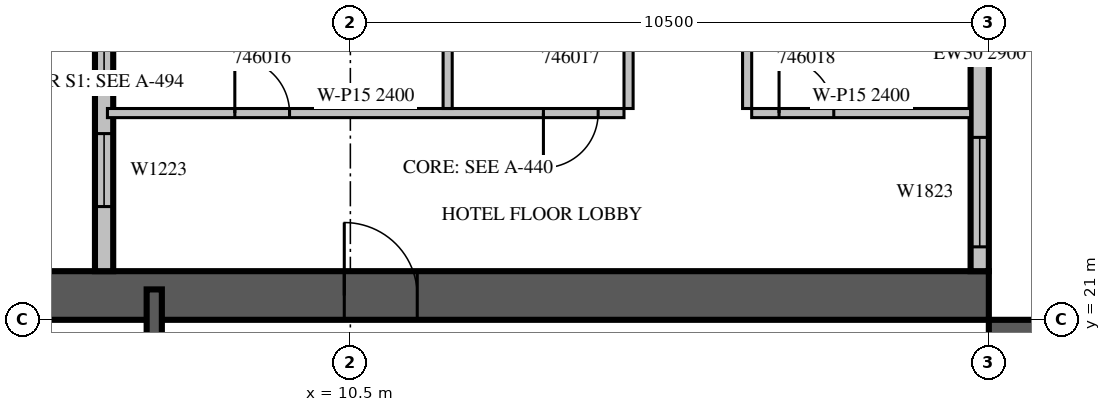
"""IFC4 building model, lengths in metres.
Left out: names, types, materials, properties, quantities, classifications, styles, units other than length and angle.
Written with IfcOpenShell. Run it as: python <this file> out.ifc"""

import sys

from ifc_helpers import new_model, si_unit, direction, frame, frame_2d, origin, place, context, subcontext, project, spatial, rectangle, extrude, source, transform, mapped, element, fill, save


model = new_model("IFC4")
c1 = context("Model", 3, precision=1e-05, world=origin(), true_north=direction((0.0, 1.0)))
c2 = subcontext(c1, "Body", "Model", "MODEL_VIEW")
j1 = project(units=[si_unit("LENGTHUNIT", "METRE"), si_unit("PLANEANGLEUNIT", "RADIAN")], contexts=[c1])
p1 = place(None, origin())
s1 = spatial("IfcSite", under=j1, at=p1, CompositionType="ELEMENT")
p2 = place(p1, origin())
s2 = spatial("IfcBuilding", under=s1, at=p2, CompositionType="ELEMENT")
p3 = place(p2, frame((0.0, 0.0, 208.2)))
s3 = spatial("IfcBuildingStorey", under=s2, at=p3, CompositionType="ELEMENT", Elevation=208.2)
m1 = source(origin(), c2, "Body", "SweptSolid", [
    extrude(rectangle(XDim=16.8, YDim=0.8, at=frame_2d((8.4, 0.0))), origin(), (0.0, 0.0, 1.0), 3.8),
])
p4 = place(p3, frame((21.4, 4.2, 0.0), z_axis=(0.0, 0.0, 1.0), x_axis=(0.0, 1.0, 0.0)))
e1 = element("IfcWall", 1, at=p4, inside=s3, PredefinedType="SHEAR", context=c2, shape_type="MappedRepresentation", body=[
    mapped(m1, transform((0.0, 0.0, 0.0), scale=1.0)),
])
m2 = source(origin(), c2, "Body", "SweptSolid", [
    extrude(rectangle(XDim=1.2, YDim=2.1, at=frame_2d((0.6, 1.05))), frame((0.0, 0.41, 0.0), z_axis=(0.0, -1.0, 0.0), x_axis=(1.0, 0.0, 0.0)), (0.0, 0.0, 1.0), 0.82),
])
p5 = place(p4, frame((14.7, 0.0, 0.0)))
e2 = element("IfcOpeningElement", 2, at=p5, cuts=e1, PredefinedType="OPENING", context=c2, shape_type="MappedRepresentation", body=[
    mapped(m2, transform((0.0, 0.0, 0.0), scale=1.0)),
])
p6 = place(p3, frame((4.2, 21.4, 0.0), z_axis=(0.0, 0.0, 1.0), x_axis=(1.0, 0.0, 0.0)))
e3 = element("IfcWall", 3, at=p6, inside=s3, PredefinedType="SHEAR", context=c2, shape_type="MappedRepresentation", body=[
    mapped(m1, transform((0.0, 0.0, 0.0), scale=1.0)),
])
p7 = place(p6, frame((6.2, 0.0, 0.0)))
e4 = element("IfcOpeningElement", 4, at=p7, cuts=e3, PredefinedType="OPENING", context=c2, shape_type="MappedRepresentation", body=[
    mapped(m2, transform((0.0, 0.0, 0.0), scale=1.0)),
])
p8 = place(p3, frame((20.85, 21.8, 0.0), z_axis=(0.0, 0.0, 1.0), x_axis=(0.0, 1.0, 0.0)))
e5 = element("IfcWall", 5, at=p8, inside=s3, PredefinedType="STANDARD", context=c2, shape_type="SweptSolid", body=[
    extrude(rectangle(XDim=7.15, YDim=0.3, at=frame_2d((3.575, 0.0))), origin(), (0.0, 0.0, 1.0), 2.9),
])
m3 = source(origin(), c2, "Body", "SweptSolid", [
    extrude(rectangle(XDim=1.8, YDim=2.3, at=frame_2d((0.9, 1.15))), frame((0.0, 0.16, 0.0), z_axis=(0.0, -1.0, 0.0), x_axis=(1.0, 0.0, 0.0)), (0.0, 0.0, 1.0), 0.32),
])
p9 = place(p8, frame((0.4, 0.0, 0.6)))
e6 = element("IfcOpeningElement", 6, at=p9, cuts=e5, PredefinedType="OPENING", context=c2, shape_type="MappedRepresentation", body=[
    mapped(m3, transform((0.0, 0.0, 0.0), scale=1.0)),
])
m4 = source(origin(), c2, "Body", "SweptSolid", [
    extrude(rectangle(XDim=3.0, YDim=2.3, at=frame_2d((1.5, 1.15))), frame((0.0, 0.16, 0.0), z_axis=(0.0, -1.0, 0.0), x_axis=(1.0, 0.0, 0.0)), (0.0, 0.0, 1.0), 0.32),
])
p10 = place(p8, frame((4.0, 0.0, 0.6)))
e7 = element("IfcOpeningElement", 7, at=p10, cuts=e5, PredefinedType="OPENING", context=c2, shape_type="MappedRepresentation", body=[
    mapped(m4, transform((0.0, 0.0, 0.0), scale=1.0)),
])
m5 = source(origin(), c2, "Body", "SweptSolid", [
    extrude(rectangle(XDim=16.6, YDim=0.3, at=frame_2d((8.3, 0.0))), origin(), (0.0, 0.0, 1.0), 3.4),
])
p11 = place(p3, frame((6.45, 38.4, 0.0), z_axis=(0.0, 0.0, 1.0), x_axis=(0.0, -1.0, 0.0)))
e8 = element("IfcWall", 8, at=p11, inside=s3, PredefinedType="STANDARD", context=c2, shape_type="MappedRepresentation", body=[
    mapped(m5, transform((0.0, 0.0, 0.0), scale=1.0)),
])
p12 = place(p11, frame((1.15, 0.0, 0.6)))
e9 = element("IfcOpeningElement", 9, at=p12, cuts=e8, PredefinedType="OPENING", context=c2, shape_type="MappedRepresentation", body=[
    mapped(m3, transform((0.0, 0.0, 0.0), scale=1.0)),
])
p13 = place(p11, frame((9.438, 0.0, 0.6)))
e10 = element("IfcOpeningElement", 10, at=p13, cuts=e8, PredefinedType="OPENING", context=c2, shape_type="MappedRepresentation", body=[
    mapped(m3, transform((0.0, 0.0, 0.0), scale=1.0)),
])
m6 = source(origin(), c2, "Body", "SweptSolid", [
    extrude(rectangle(XDim=1.2, YDim=2.3, at=frame_2d((0.6, 1.15))), frame((0.0, 0.16, 0.0), z_axis=(0.0, -1.0, 0.0), x_axis=(1.0, 0.0, 0.0)), (0.0, 0.0, 1.0), 0.32),
])
p14 = place(p11, frame((14.338, 0.0, 0.6)))
e11 = element("IfcOpeningElement", 11, at=p14, cuts=e8, PredefinedType="OPENING", context=c2, shape_type="MappedRepresentation", body=[
    mapped(m6, transform((0.0, 0.0, 0.0), scale=1.0)),
])
p15 = place(p11, frame((11.887, 0.0, 0.6)))
e12 = element("IfcOpeningElement", 12, at=p15, cuts=e8, PredefinedType="OPENING", context=c2, shape_type="MappedRepresentation", body=[
    mapped(m3, transform((0.0, 0.0, 0.0), scale=1.0)),
])
m7 = source(origin(), c2, "Body", "SweptSolid", [
    extrude(rectangle(XDim=1.0, YDim=2.1, at=frame_2d((0.5, 1.05))), frame((0.0, 0.16, 0.0), z_axis=(0.0, -1.0, 0.0), x_axis=(1.0, 0.0, 0.0)), (0.0, 0.0, 1.0), 0.32),
])
p16 = place(p11, frame((5.45, 0.0, 0.0)))
e13 = element("IfcOpeningElement", 13, at=p16, cuts=e8, PredefinedType="OPENING", context=c2, shape_type="MappedRepresentation", body=[
    mapped(m7, transform((0.0, 0.0, 0.0), scale=1.0)),
])
m8 = source(origin(), c2, "Body", "SweptSolid", [
    extrude(rectangle(XDim=6.6, YDim=0.25, at=frame_2d((3.3, 0.0))), origin(), (0.0, 0.0, 1.0), 3.4),
])
p17 = place(p3, frame((7.275, 14.9, 0.0), z_axis=(0.0, 0.0, 1.0), x_axis=(0.0, 1.0, 0.0)))
e14 = element("IfcWall", 14, at=p17, inside=s3, PredefinedType="SOLIDWALL", context=c2, shape_type="MappedRepresentation", body=[
    mapped(m8, transform((0.0, 0.0, 0.0), scale=1.0)),
])
m9 = source(origin(), c2, "Body", "SweptSolid", [
    extrude(rectangle(XDim=1.1, YDim=2.1, at=frame_2d((0.55, 1.05))), frame((0.0, 0.135, 0.0), z_axis=(0.0, -1.0, 0.0), x_axis=(1.0, 0.0, 0.0)), (0.0, 0.0, 1.0), 0.27),
])
p18 = place(p17, frame((0.15, 0.0, 0.0)))
e15 = element("IfcOpeningElement", 15, at=p18, cuts=e14, PredefinedType="OPENING", context=c2, shape_type="MappedRepresentation", body=[
    mapped(m9, transform((0.0, 0.0, 0.0), scale=1.0)),
])
p19 = place(p3, frame((6.505, 24.4, 0.0), z_axis=(0.0, 0.0, 1.0), x_axis=(1.0, 0.0, 0.0)))
e16 = element("IfcWall", 16, at=p19, inside=s3, PredefinedType="PARTITIONING", context=c2, shape_type="SweptSolid", body=[
    extrude(rectangle(XDim=8.495, YDim=0.15, at=frame_2d((4.247, 0.0))), origin(), (0.0, 0.0, 1.0), 2.4),
])
m10 = source(origin(), c2, "Body", "SweptSolid", [
    extrude(rectangle(XDim=0.9, YDim=2.1, at=frame_2d((0.45, 1.05))), frame((0.0, 0.085, 0.0), z_axis=(0.0, -1.0, 0.0), x_axis=(1.0, 0.0, 0.0)), (0.0, 0.0, 1.0), 0.17),
])
p20 = place(p19, frame((2.095, 0.0, 0.0)))
e17 = element("IfcOpeningElement", 17, at=p20, cuts=e16, PredefinedType="OPENING", context=c2, shape_type="MappedRepresentation", body=[
    mapped(m10, transform((0.0, 0.0, 0.0), scale=1.0)),
])
p21 = place(p19, frame((7.17, 0.0, 0.0)))
e18 = element("IfcOpeningElement", 18, at=p21, cuts=e16, PredefinedType="OPENING", context=c2, shape_type="MappedRepresentation", body=[
    mapped(m10, transform((0.0, 0.0, 0.0), scale=1.0)),
])
m11 = source(origin(), c2, "Body", "SweptSolid", [
    extrude(rectangle(XDim=3.6, YDim=0.15, at=frame_2d((1.8, 0.0))), origin(), (0.0, 0.0, 1.0), 2.4),
])
p22 = place(p3, frame((17.1, 24.4, 0.0), z_axis=(0.0, 0.0, 1.0), x_axis=(1.0, 0.0, 0.0)))
e19 = element("IfcWall", 19, at=p22, inside=s3, PredefinedType="PARTITIONING", context=c2, shape_type="MappedRepresentation", body=[
    mapped(m11, transform((0.0, 0.0, 0.0), scale=1.0)),
])
p23 = place(p22, frame((0.45, 0.0, 0.0)))
e20 = element("IfcOpeningElement", 20, at=p23, cuts=e19, PredefinedType="OPENING", context=c2, shape_type="MappedRepresentation", body=[
    mapped(m10, transform((0.0, 0.0, 0.0), scale=1.0)),
])
p24 = place(p3, frame((12.1, 24.475, 0.0), z_axis=(0.0, 0.0, 1.0), x_axis=(0.0, 1.0, 0.0)))
e21 = element("IfcWall", 21, at=p24, inside=s3, PredefinedType="PARTITIONING", context=c2, shape_type="SweptSolid", body=[
    extrude(rectangle(XDim=4.85, YDim=0.15, at=frame_2d((2.425, 0.0))), origin(), (0.0, 0.0, 1.0), 2.9),
])
m12 = source(origin(), c2, "Body", "SweptSolid", [
    extrude(rectangle(XDim=4.85, YDim=0.15, at=frame_2d((2.425, 0.0))), origin(), (0.0, 0.0, 1.0), 2.9),
])
for number, where, z_axis, x_axis in (
    (22, (15.075, 24.475, 0.0), (0.0, 0.0, 1.0), (0.0, 1.0, 0.0)),
    (23, (17.025, 29.325, 0.0), (0.0, 0.0, 1.0), (0.0, -1.0, 0.0)),
):
    element("IfcWall", number, at=place(p3, frame(where, z_axis=z_axis, x_axis=x_axis)), inside=s3, PredefinedType="PARTITIONING", context=c2, shape_type="MappedRepresentation", body=[
        mapped(m12, transform((0.0, 0.0, 0.0), scale=1.0)),
    ])
m13 = source(origin(), c2, "Body", "SweptSolid", [
    extrude(rectangle(XDim=1.8, YDim=2.3, at=frame_2d((0.9, 1.15))), frame((0.0, 0.03, 0.0), z_axis=(0.0, -1.0, 0.0), x_axis=(1.0, 0.0, 0.0)), (0.0, 0.0, 1.0), 0.06),
])
p25 = place(p9, origin())
e24 = element("IfcWindow", 24, at=p25, inside=s3, PartitioningType="SINGLE_PANEL", PredefinedType="WINDOW", context=c2, shape_type="MappedRepresentation", body=[
    mapped(m13, transform((0.0, 0.0, 0.0), scale=1.0)),
])
fill(e6, e24)
m14 = source(origin(), c2, "Body", "SweptSolid", [
    extrude(rectangle(XDim=1.2, YDim=2.3, at=frame_2d((0.6, 1.15))), frame((0.0, 0.03, 0.0), z_axis=(0.0, -1.0, 0.0), x_axis=(1.0, 0.0, 0.0)), (0.0, 0.0, 1.0), 0.06),
])
p26 = place(p14, origin())
e25 = element("IfcWindow", 25, at=p26, inside=s3, PartitioningType="SINGLE_PANEL", PredefinedType="WINDOW", context=c2, shape_type="MappedRepresentation", body=[
    mapped(m14, transform((0.0, 0.0, 0.0), scale=1.0)),
])
fill(e11, e25)
p27 = place(p15, origin())
e26 = element("IfcWindow", 26, at=p27, inside=s3, PartitioningType="SINGLE_PANEL", PredefinedType="WINDOW", context=c2, shape_type="MappedRepresentation", body=[
    mapped(m13, transform((0.0, 0.0, 0.0), scale=1.0)),
])
fill(e12, e26)
m15 = source(origin(), c2, "Body", "SweptSolid", [
    extrude(rectangle(XDim=1.2, YDim=2.1, at=frame_2d((0.6, 1.05))), frame((0.0, 0.025, 0.0), z_axis=(0.0, -1.0, 0.0), x_axis=(1.0, 0.0, 0.0)), (0.0, 0.0, 1.0), 0.05),
])
p28 = place(p7, origin())
e27 = element("IfcDoor", 27, at=p28, inside=s3, OperationType="SINGLE_SWING_LEFT", PredefinedType="DOOR", context=c2, shape_type="MappedRepresentation", body=[
    mapped(m15, transform((0.0, 0.0, 0.0), scale=1.0)),
])
fill(e4, e27)
m16 = source(origin(), c2, "Body", "SweptSolid", [
    extrude(rectangle(XDim=0.9, YDim=2.1, at=frame_2d((0.45, 1.05))), frame((0.0, 0.025, 0.0), z_axis=(0.0, -1.0, 0.0), x_axis=(1.0, 0.0, 0.0)), (0.0, 0.0, 1.0), 0.05),
])
p29 = place(p20, origin())
e28 = element("IfcDoor", 28, at=p29, inside=s3, OperationType="SINGLE_SWING_LEFT", PredefinedType="DOOR", context=c2, shape_type="MappedRepresentation", body=[
    mapped(m16, transform((0.0, 0.0, 0.0), scale=1.0)),
])
fill(e17, e28)
p30 = place(p21, origin())
e29 = element("IfcDoor", 29, at=p30, inside=s3, OperationType="SINGLE_SWING_RIGHT", PredefinedType="DOOR", context=c2, shape_type="MappedRepresentation", body=[
    mapped(m16, transform((0.0, 0.0, 0.0), scale=1.0)),
])
fill(e18, e29)
p31 = place(p23, origin())
e30 = element("IfcDoor", 30, at=p31, inside=s3, OperationType="SINGLE_SWING_LEFT", PredefinedType="DOOR", context=c2, shape_type="MappedRepresentation", body=[
    mapped(m16, transform((0.0, 0.0, 0.0), scale=1.0)),
])
fill(e20, e30)
save(model, sys.argv[1])
